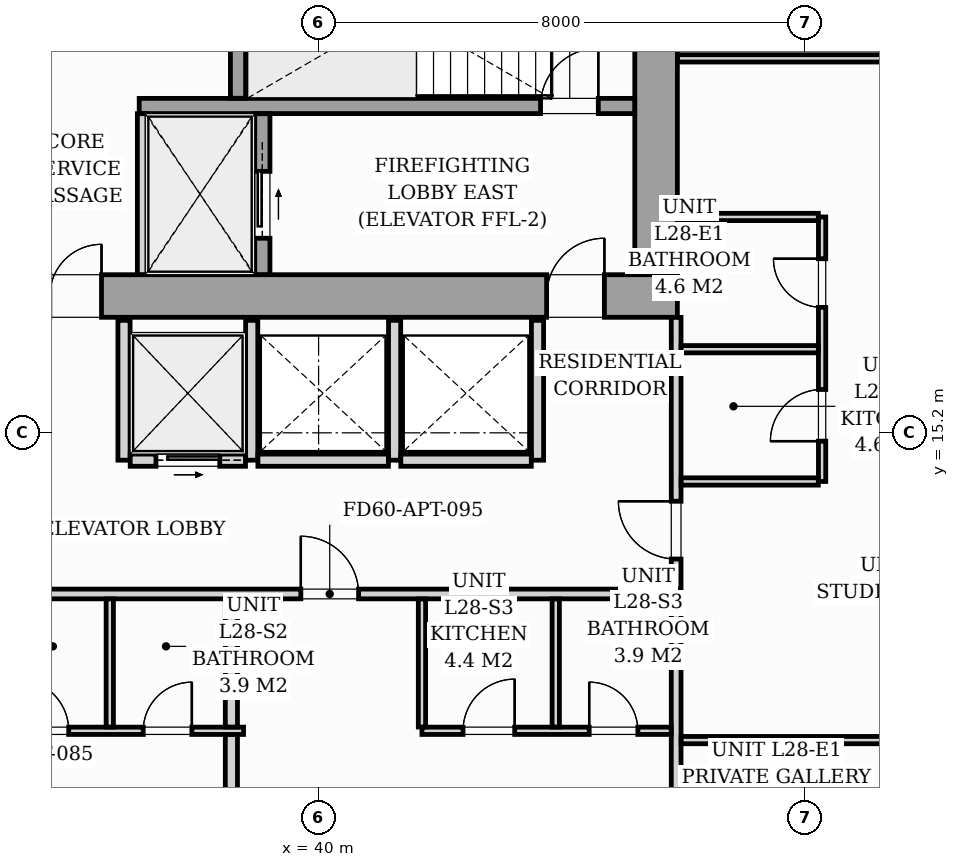
"""IFC4 building model, lengths in metres.
Left out: names, types, materials, properties, quantities, classifications, styles, units other than length and angle.
Written with IfcOpenShell. Run it as: python <this file> out.ifc"""

import sys

from ifc_helpers import new_model, si_unit, direction, frame, frame_2d, origin, origin_2d, place, context, subcontext, project, spatial, rectangle, i_section, extrude, source, transform, mapped, element, fill, save


model = new_model("IFC4")
c1 = context("Model", 3, precision=1e-05, world=origin(), true_north=direction((0.0, 1.0)))
c2 = subcontext(c1, "Body", "Model", "MODEL_VIEW")
j1 = project(units=[si_unit("LENGTHUNIT", "METRE"), si_unit("PLANEANGLEUNIT", "RADIAN")], contexts=[c1])
p1 = place(None, origin())
s1 = spatial("IfcSite", under=j1, at=p1, CompositionType="ELEMENT")
p2 = place(p1, origin())
s2 = spatial("IfcBuilding", under=s1, at=p2, CompositionType="ELEMENT")
p3 = place(p2, frame((0.0, 0.0, 100.2)))
s3 = spatial("IfcBuildingStorey", under=s2, at=p3, CompositionType="ELEMENT", Elevation=100.2)
m1 = source(origin(), c2, "Body", "SweptSolid", [
    extrude(i_section(OverallWidth=0.427, OverallDepth=0.483, WebThickness=0.051, FlangeThickness=0.082, FilletRadius=0.018, at=origin_2d()), origin(), (0.0, 0.0, 1.0), 3.196),
])
for number, where, z_axis, x_axis in (
    (1, (38.88, 17.4, 0.002), (0.0, 0.0, 1.0), (1.0, 0.0, 0.0)),
    (2, (45.6, 17.4, 0.002), (0.0, 0.0, 1.0), (1.0, 0.0, 0.0)),
):
    element("IfcColumn", number, at=place(p3, frame(where, z_axis=z_axis, x_axis=x_axis)), inside=s3, PredefinedType="PILASTER", context=c2, shape_type="MappedRepresentation", body=[
        mapped(m1, transform((0.0, 0.0, 0.0), scale=1.0)),
    ])
p4 = place(p3, frame((26.1, 17.45, 0.0), z_axis=(0.0, 0.0, 1.0), x_axis=(1.0, 0.0, 0.0)))
e3 = element("IfcWall", 3, at=p4, inside=s3, PredefinedType="SHEAR", context=c2, shape_type="SweptSolid", body=[
    extrude(rectangle(XDim=19.8, YDim=0.7, at=frame_2d((9.9, 0.0))), origin(), (0.0, 0.0, 1.0), 3.2),
])
p5 = place(p4, frame((1.05, 0.0, 0.0)))
e4 = element("IfcOpeningElement", 4, at=p5, cuts=e3, PredefinedType="OPENING", context=c2, shape_type="SweptSolid", body=[
    extrude(rectangle(XDim=0.95, YDim=2.06, at=frame_2d((0.475, 1.03))), frame((0.0, 0.36, 0.0), z_axis=(0.0, -1.0, 0.0), x_axis=(1.0, 0.0, 0.0)), (0.0, 0.0, 1.0), 0.72),
])
p6 = place(p4, frame((9.48, 0.0, 0.0)))
e5 = element("IfcOpeningElement", 5, at=p6, cuts=e3, PredefinedType="OPENING", context=c2, shape_type="SweptSolid", body=[
    extrude(rectangle(XDim=0.85, YDim=2.0, at=frame_2d((0.425, 1.0))), frame((0.0, 0.36, 0.0), z_axis=(0.0, -1.0, 0.0), x_axis=(1.0, 0.0, 0.0)), (0.0, 0.0, 1.0), 0.72),
])
p7 = place(p4, frame((17.65, 0.0, 0.0)))
e6 = element("IfcOpeningElement", 6, at=p7, cuts=e3, PredefinedType="OPENING", context=c2, shape_type="SweptSolid", body=[
    extrude(rectangle(XDim=0.95, YDim=2.06, at=frame_2d((0.475, 1.03))), frame((0.0, 0.36, 0.0), z_axis=(0.0, -1.0, 0.0), x_axis=(1.0, 0.0, 0.0)), (0.0, 0.0, 1.0), 0.72),
])
p8 = place(p3, frame((45.55, 17.802, 0.0), z_axis=(0.0, 0.0, 1.0), x_axis=(0.0, 1.0, 0.0)))
e7 = element("IfcWall", 7, at=p8, inside=s3, PredefinedType="SHEAR", context=c2, shape_type="SweptSolid", body=[
    extrude(rectangle(XDim=5.796, YDim=0.7, at=frame_2d((2.898, 0.0))), origin(), (0.0, 0.0, 1.0), 3.2),
])
p9 = place(p3, frame((37.05, 20.575, 0.0), z_axis=(0.0, 0.0, 1.0), x_axis=(1.0, 0.0, 0.0)))
e8 = element("IfcWall", 8, at=p9, inside=s3, PredefinedType="SOLIDWALL", context=c2, shape_type="SweptSolid", body=[
    extrude(rectangle(XDim=8.148, YDim=0.25, at=frame_2d((4.074, 0.0))), origin(), (0.0, 0.0, 1.0), 3.2),
])
p10 = place(p9, frame((6.6, 0.0, 0.0)))
e9 = element("IfcOpeningElement", 9, at=p10, cuts=e8, PredefinedType="OPENING", context=c2, shape_type="SweptSolid", body=[
    extrude(rectangle(XDim=0.95, YDim=2.06, at=frame_2d((0.475, 1.03))), frame((0.0, 0.135, 0.0), z_axis=(0.0, -1.0, 0.0), x_axis=(1.0, 0.0, 0.0)), (0.0, 0.0, 1.0), 0.27),
])
p11 = place(p3, frame((38.675, 20.702, 0.0), z_axis=(0.0, 0.0, 1.0), x_axis=(0.0, 1.0, 0.0)))
e10 = element("IfcWall", 10, at=p11, inside=s3, PredefinedType="SOLIDWALL", context=c2, shape_type="SweptSolid", body=[
    extrude(rectangle(XDim=2.896, YDim=0.25, at=frame_2d((1.448, 0.0))), origin(), (0.0, 0.0, 1.0), 3.2),
])
p12 = place(p3, frame((37.1, 17.802, 0.0), z_axis=(0.0, 0.0, 1.0), x_axis=(0.0, 1.0, 0.0)))
e11 = element("IfcWall", 11, at=p12, inside=s3, PredefinedType="PARTITIONING", context=c2, shape_type="SweptSolid", body=[
    extrude(rectangle(XDim=2.646, YDim=0.16, at=frame_2d((1.323, 0.0))), origin(), (0.0, 0.0, 1.0), 2.94),
])
p13 = place(p3, frame((39.075, 17.802, 0.0), z_axis=(0.0, 0.0, 1.0), x_axis=(0.0, 1.0, 0.0)))
e12 = element("IfcWall", 12, at=p13, inside=s3, PredefinedType="SOLIDWALL", context=c2, shape_type="SweptSolid", body=[
    extrude(rectangle(XDim=2.646, YDim=0.25, at=frame_2d((1.323, 0.0))), origin(), (0.0, 0.0, 1.0), 3.2),
])
p14 = place(p13, frame((0.598, 0.0, 0.0)))
e13 = element("IfcOpeningElement", 13, at=p14, cuts=e12, PredefinedType="OPENING", context=c2, shape_type="SweptSolid", body=[
    extrude(rectangle(XDim=1.1, YDim=2.08, at=frame_2d((0.55, 1.04))), frame((0.0, 0.135, 0.0), z_axis=(0.0, -1.0, 0.0), x_axis=(1.0, 0.0, 0.0)), (0.0, 0.0, 1.0), 0.27),
])
for number, where, z_axis, x_axis in (
    (14, (36.8, 14.75, 0.0), (0.0, 0.0, 1.0), (0.0, 1.0, 0.0)),
    (15, (38.9, 14.75, 0.0), (0.0, 0.0, 1.0), (0.0, 1.0, 0.0)),
):
    element("IfcWall", number, at=place(p3, frame(where, z_axis=z_axis, x_axis=x_axis)), inside=s3, PredefinedType="PARTITIONING", context=c2, shape_type="SweptSolid", body=[
        extrude(rectangle(XDim=2.3, YDim=0.2, at=frame_2d((1.15, 0.0))), origin(), (0.0, 0.0, 1.0), 2.94),
    ])
p15 = place(p3, frame((36.902, 14.75, 0.0), z_axis=(0.0, 0.0, 1.0), x_axis=(1.0, 0.0, 0.0)))
e16 = element("IfcWall", 16, at=p15, inside=s3, PredefinedType="PARTITIONING", context=c2, shape_type="SweptSolid", body=[
    extrude(rectangle(XDim=1.896, YDim=0.2, at=frame_2d((0.948, 0.0))), origin(), (0.0, 0.0, 1.0), 2.94),
])
p16 = place(p15, frame((0.423, 0.0, 0.0)))
e17 = element("IfcOpeningElement", 17, at=p16, cuts=e16, PredefinedType="OPENING", context=c2, shape_type="SweptSolid", body=[
    extrude(rectangle(XDim=1.05, YDim=2.08, at=frame_2d((0.525, 1.04))), frame((0.0, 0.11, 0.0), z_axis=(0.0, -1.0, 0.0), x_axis=(1.0, 0.0, 0.0)), (0.0, 0.0, 1.0), 0.22),
])
for number, where, z_axis, x_axis in (
    (18, (41.25, 14.75, 0.0), (0.0, 0.0, 1.0), (0.0, 1.0, 0.0)),
    (19, (43.6, 14.75, 0.0), (0.0, 0.0, 1.0), (0.0, 1.0, 0.0)),
):
    element("IfcWall", number, at=place(p3, frame(where, z_axis=z_axis, x_axis=x_axis)), inside=s3, PredefinedType="PARTITIONING", context=c2, shape_type="SweptSolid", body=[
        extrude(rectangle(XDim=2.3, YDim=0.2, at=frame_2d((1.15, 0.0))), origin(), (0.0, 0.0, 1.0), 2.94),
    ])
for number, where, z_axis, x_axis in (
    (20, (39.002, 14.75, 0.0), (0.0, 0.0, 1.0), (1.0, 0.0, 0.0)),
    (21, (41.352, 14.75, 0.0), (0.0, 0.0, 1.0), (1.0, 0.0, 0.0)),
):
    element("IfcWall", number, at=place(p3, frame(where, z_axis=z_axis, x_axis=x_axis)), inside=s3, PredefinedType="PARTITIONING", context=c2, shape_type="SweptSolid", body=[
        extrude(rectangle(XDim=2.146, YDim=0.2, at=frame_2d((1.073, 0.0))), origin(), (0.0, 0.0, 1.0), 2.94),
    ])
p17 = place(p3, frame((21.5, 12.55, 0.0), z_axis=(0.0, 0.0, 1.0), x_axis=(1.0, 0.0, 0.0)))
e22 = element("IfcWall", 22, at=p17, inside=s3, PredefinedType="PARTITIONING", context=c2, shape_type="SweptSolid", body=[
    extrude(rectangle(XDim=24.38, YDim=0.16, at=frame_2d((12.19, 0.0))), origin(), (0.0, 0.0, 1.0), 2.94),
])
p18 = place(p17, frame((6.075, 0.0, 0.0)))
e23 = element("IfcOpeningElement", 23, at=p18, cuts=e22, PredefinedType="OPENING", context=c2, shape_type="SweptSolid", body=[
    extrude(rectangle(XDim=0.95, YDim=2.06, at=frame_2d((0.475, 1.03))), frame((0.0, 0.09, 0.0), z_axis=(0.0, -1.0, 0.0), x_axis=(1.0, 0.0, 0.0)), (0.0, 0.0, 1.0), 0.18),
])
p19 = place(p17, frame((10.519, 0.0, 0.0)))
e24 = element("IfcOpeningElement", 24, at=p19, cuts=e22, PredefinedType="OPENING", context=c2, shape_type="SweptSolid", body=[
    extrude(rectangle(XDim=0.95, YDim=2.06, at=frame_2d((0.475, 1.03))), frame((0.0, 0.09, 0.0), z_axis=(0.0, -1.0, 0.0), x_axis=(1.0, 0.0, 0.0)), (0.0, 0.0, 1.0), 0.18),
])
p20 = place(p17, frame((18.208, 0.0, 0.0)))
e25 = element("IfcOpeningElement", 25, at=p20, cuts=e22, PredefinedType="OPENING", context=c2, shape_type="SweptSolid", body=[
    extrude(rectangle(XDim=0.95, YDim=2.06, at=frame_2d((0.475, 1.03))), frame((0.0, 0.09, 0.0), z_axis=(0.0, -1.0, 0.0), x_axis=(1.0, 0.0, 0.0)), (0.0, 0.0, 1.0), 0.18),
])
p21 = place(p3, frame((45.88, 6.977, 0.0), z_axis=(0.0, 0.0, 1.0), x_axis=(0.0, 1.0, 0.0)))
e26 = element("IfcWall", 26, at=p21, inside=s3, PredefinedType="PARTITIONING", context=c2, shape_type="SweptSolid", body=[
    extrude(rectangle(XDim=5.491, YDim=0.16, at=frame_2d((2.745, 0.0))), origin(), (0.0, 0.0, 1.0), 2.94),
])
p22 = place(p3, frame((45.88, 12.632, 0.0), z_axis=(0.0, 0.0, 1.0), x_axis=(0.0, 1.0, 0.0)))
e27 = element("IfcWall", 27, at=p22, inside=s3, PredefinedType="PARTITIONING", context=c2, shape_type="SweptSolid", body=[
    extrude(rectangle(XDim=4.466, YDim=0.16, at=frame_2d((2.233, 0.0))), origin(), (0.0, 0.0, 1.0), 2.94),
])
p23 = place(p22, frame((0.493, 0.0, 0.0)))
e28 = element("IfcOpeningElement", 28, at=p23, cuts=e27, PredefinedType="OPENING", context=c2, shape_type="SweptSolid", body=[
    extrude(rectangle(XDim=0.95, YDim=2.06, at=frame_2d((0.475, 1.03))), frame((0.0, 0.09, 0.0), z_axis=(0.0, -1.0, 0.0), x_axis=(1.0, 0.0, 0.0)), (0.0, 0.0, 1.0), 0.18),
])
p24 = place(p3, frame((34.366, 10.3, 0.0), z_axis=(0.0, 0.0, 1.0), x_axis=(1.0, 0.0, 0.0)))
e29 = element("IfcWall", 29, at=p24, inside=s3, PredefinedType="PARTITIONING", context=c2, shape_type="SweptSolid", body=[
    extrude(rectangle(XDim=4.4, YDim=0.12, at=frame_2d((2.2, 0.0))), origin(), (0.0, 0.0, 1.0), 2.94),
])
p25 = place(p24, frame((0.675, 0.0, 0.0)))
e30 = element("IfcOpeningElement", 30, at=p25, cuts=e29, PredefinedType="OPENING", context=c2, shape_type="SweptSolid", body=[
    extrude(rectangle(XDim=0.85, YDim=2.05, at=frame_2d((0.425, 1.025))), frame((0.0, 0.07, 0.0), z_axis=(0.0, -1.0, 0.0), x_axis=(1.0, 0.0, 0.0)), (0.0, 0.0, 1.0), 0.14),
])
p26 = place(p24, frame((2.75, 0.0, 0.0)))
e31 = element("IfcOpeningElement", 31, at=p26, cuts=e29, PredefinedType="OPENING", context=c2, shape_type="SweptSolid", body=[
    extrude(rectangle(XDim=0.8, YDim=2.02, at=frame_2d((0.4, 1.01))), frame((0.0, 0.07, 0.0), z_axis=(0.0, -1.0, 0.0), x_axis=(1.0, 0.0, 0.0)), (0.0, 0.0, 1.0), 0.14),
])
p27 = place(p3, frame((36.566, 10.362, 0.0), z_axis=(0.0, 0.0, 1.0), x_axis=(0.0, 1.0, 0.0)))
e32 = element("IfcWall", 32, at=p27, inside=s3, PredefinedType="PARTITIONING", context=c2, shape_type="SweptSolid", body=[
    extrude(rectangle(XDim=2.106, YDim=0.12, at=frame_2d((1.053, 0.0))), origin(), (0.0, 0.0, 1.0), 2.94),
])
p28 = place(p3, frame((38.566, 6.273, 0.0), z_axis=(0.0, 0.0, 1.0), x_axis=(0.0, 1.0, 0.0)))
e33 = element("IfcWall", 33, at=p28, inside=s3, PredefinedType="PARTITIONING", context=c2, shape_type="SweptSolid", body=[
    extrude(rectangle(XDim=3.965, YDim=0.2, at=frame_2d((1.982, 0.0))), origin(), (0.0, 0.0, 1.0), 2.94),
])
p29 = place(p3, frame((38.566, 10.362, 0.0), z_axis=(0.0, 0.0, 1.0), x_axis=(0.0, 1.0, 0.0)))
e34 = element("IfcWall", 34, at=p29, inside=s3, PredefinedType="PARTITIONING", context=c2, shape_type="SweptSolid", body=[
    extrude(rectangle(XDim=2.106, YDim=0.2, at=frame_2d((1.053, 0.0))), origin(), (0.0, 0.0, 1.0), 2.94),
])
p30 = place(p3, frame((41.7, 10.3, 0.0), z_axis=(0.0, 0.0, 1.0), x_axis=(1.0, 0.0, 0.0)))
e35 = element("IfcWall", 35, at=p30, inside=s3, PredefinedType="PARTITIONING", context=c2, shape_type="SweptSolid", body=[
    extrude(rectangle(XDim=4.098, YDim=0.12, at=frame_2d((2.049, 0.0))), origin(), (0.0, 0.0, 1.0), 2.94),
])
p31 = place(p30, frame((0.675, 0.0, 0.0)))
e36 = element("IfcOpeningElement", 36, at=p31, cuts=e35, PredefinedType="OPENING", context=c2, shape_type="SweptSolid", body=[
    extrude(rectangle(XDim=0.85, YDim=2.05, at=frame_2d((0.425, 1.025))), frame((0.0, 0.07, 0.0), z_axis=(0.0, -1.0, 0.0), x_axis=(1.0, 0.0, 0.0)), (0.0, 0.0, 1.0), 0.14),
])
p32 = place(p30, frame((2.75, 0.0, 0.0)))
e37 = element("IfcOpeningElement", 37, at=p32, cuts=e35, PredefinedType="OPENING", context=c2, shape_type="SweptSolid", body=[
    extrude(rectangle(XDim=0.8, YDim=2.02, at=frame_2d((0.4, 1.01))), frame((0.0, 0.07, 0.0), z_axis=(0.0, -1.0, 0.0), x_axis=(1.0, 0.0, 0.0)), (0.0, 0.0, 1.0), 0.14),
])
for number, where, z_axis, x_axis in (
    (38, (41.7, 10.362, 0.0), (0.0, 0.0, 1.0), (0.0, 1.0, 0.0)),
    (39, (43.9, 10.362, 0.0), (0.0, 0.0, 1.0), (0.0, 1.0, 0.0)),
):
    element("IfcWall", number, at=place(p3, frame(where, z_axis=z_axis, x_axis=x_axis)), inside=s3, PredefinedType="PARTITIONING", context=c2, shape_type="SweptSolid", body=[
        extrude(rectangle(XDim=2.106, YDim=0.12, at=frame_2d((1.053, 0.0))), origin(), (0.0, 0.0, 1.0), 2.94),
    ])
p33 = place(p3, frame((48.28, 14.4, 0.0), z_axis=(0.0, 0.0, 1.0), x_axis=(0.0, 1.0, 0.0)))
e40 = element("IfcWall", 40, at=p33, inside=s3, PredefinedType="PARTITIONING", context=c2, shape_type="SweptSolid", body=[
    extrude(rectangle(XDim=4.35, YDim=0.12, at=frame_2d((2.175, 0.0))), origin(), (0.0, 0.0, 1.0), 2.94),
])
p34 = place(p33, frame((0.663, 0.0, 0.0)))
e41 = element("IfcOpeningElement", 41, at=p34, cuts=e40, PredefinedType="OPENING", context=c2, shape_type="SweptSolid", body=[
    extrude(rectangle(XDim=0.85, YDim=2.05, at=frame_2d((0.425, 1.025))), frame((0.0, 0.07, 0.0), z_axis=(0.0, -1.0, 0.0), x_axis=(1.0, 0.0, 0.0)), (0.0, 0.0, 1.0), 0.14),
])
p35 = place(p33, frame((2.863, 0.0, 0.0)))
e42 = element("IfcOpeningElement", 42, at=p35, cuts=e40, PredefinedType="OPENING", context=c2, shape_type="SweptSolid", body=[
    extrude(rectangle(XDim=0.8, YDim=2.02, at=frame_2d((0.4, 1.01))), frame((0.0, 0.07, 0.0), z_axis=(0.0, -1.0, 0.0), x_axis=(1.0, 0.0, 0.0)), (0.0, 0.0, 1.0), 0.14),
])
for number, where, z_axis, x_axis in (
    (43, (45.962, 16.575, 0.0), (0.0, 0.0, 1.0), (1.0, 0.0, 0.0)),
    (44, (45.962, 14.4, 0.0), (0.0, 0.0, 1.0), (1.0, 0.0, 0.0)),
):
    element("IfcWall", number, at=place(p3, frame(where, z_axis=z_axis, x_axis=x_axis)), inside=s3, PredefinedType="PARTITIONING", context=c2, shape_type="SweptSolid", body=[
        extrude(rectangle(XDim=2.256, YDim=0.12, at=frame_2d((1.128, 0.0))), origin(), (0.0, 0.0, 1.0), 2.94),
    ])
p36 = place(p3, frame((45.902, 18.75, 0.0), z_axis=(0.0, 0.0, 1.0), x_axis=(1.0, 0.0, 0.0)))
e45 = element("IfcWall", 45, at=p36, inside=s3, PredefinedType="PARTITIONING", context=c2, shape_type="SweptSolid", body=[
    extrude(rectangle(XDim=2.316, YDim=0.12, at=frame_2d((1.158, 0.0))), origin(), (0.0, 0.0, 1.0), 2.94),
])
p37 = place(p3, frame((45.902, 21.358, 0.0), z_axis=(0.0, 0.0, 1.0), x_axis=(1.0, 0.0, 0.0)))
e46 = element("IfcWall", 46, at=p37, inside=s3, PredefinedType="PARTITIONING", context=c2, shape_type="SweptSolid", body=[
    extrude(rectangle(XDim=22.668, YDim=0.12, at=frame_2d((11.334, 0.0))), origin(), (0.0, 0.0, 1.0), 2.94),
])
p38 = place(p37, frame((10.945, 0.0, 0.0)))
e47 = element("IfcOpeningElement", 47, at=p38, cuts=e46, PredefinedType="OPENING", context=c2, shape_type="SweptSolid", body=[
    extrude(rectangle(XDim=0.85, YDim=2.05, at=frame_2d((0.425, 1.025))), frame((0.0, 0.07, 0.0), z_axis=(0.0, -1.0, 0.0), x_axis=(1.0, 0.0, 0.0)), (0.0, 0.0, 1.0), 0.14),
])
p39 = place(p3, frame((45.962, 10.147, 0.0), z_axis=(0.0, 0.0, 1.0), x_axis=(1.0, 0.0, 0.0)))
e48 = element("IfcWall", 48, at=p39, inside=s3, PredefinedType="PARTITIONING", context=c2, shape_type="SweptSolid", body=[
    extrude(rectangle(XDim=20.994, YDim=0.12, at=frame_2d((10.497, 0.0))), origin(), (0.0, 0.0, 1.0), 2.31),
])
p40 = place(p39, frame((10.227, 0.0, 0.0)))
e49 = element("IfcOpeningElement", 49, at=p40, cuts=e48, PredefinedType="OPENING", context=c2, shape_type="SweptSolid", body=[
    extrude(rectangle(XDim=0.85, YDim=2.05, at=frame_2d((0.425, 1.025))), frame((0.0, 0.07, 0.0), z_axis=(0.0, -1.0, 0.0), x_axis=(1.0, 0.0, 0.0)), (0.0, 0.0, 1.0), 0.14),
])
m2 = source(origin(), c2, "Body", "SweptSolid", [
    extrude(rectangle(XDim=0.85, YDim=2.0, at=frame_2d((0.425, 1.0))), frame((0.0, 0.025, 0.0), z_axis=(0.0, -1.0, 0.0), x_axis=(1.0, 0.0, 0.0)), (0.0, 0.0, 1.0), 0.05),
])
p41 = place(p6, origin())
e50 = element("IfcDoor", 50, at=p41, inside=s3, OperationType="SINGLE_SWING_RIGHT", PredefinedType="DOOR", context=c2, shape_type="MappedRepresentation", body=[
    mapped(m2, transform((0.0, 0.0, 0.0), scale=1.0)),
])
fill(e5, e50)
m3 = source(origin(), c2, "Body", "SweptSolid", [
    extrude(rectangle(XDim=0.95, YDim=2.06, at=frame_2d((0.475, 1.03))), frame((0.0, 0.025, 0.0), z_axis=(0.0, -1.0, 0.0), x_axis=(1.0, 0.0, 0.0)), (0.0, 0.0, 1.0), 0.05),
])
p42 = place(p7, origin())
e51 = element("IfcDoor", 51, at=p42, inside=s3, OperationType="SINGLE_SWING_RIGHT", PredefinedType="DOOR", context=c2, shape_type="MappedRepresentation", body=[
    mapped(m3, transform((0.0, 0.0, 0.0), scale=1.0)),
])
fill(e6, e51)
p43 = place(p10, origin())
e52 = element("IfcDoor", 52, at=p43, inside=s3, OperationType="SINGLE_SWING_RIGHT", PredefinedType="DOOR", context=c2, shape_type="MappedRepresentation", body=[
    mapped(m3, transform((0.0, 0.0, 0.0), scale=1.0)),
])
fill(e9, e52)
m4 = source(origin(), c2, "Body", "SweptSolid", [
    extrude(rectangle(XDim=1.1, YDim=2.08, at=frame_2d((0.55, 1.04))), frame((0.0, 0.025, 0.0), z_axis=(0.0, -1.0, 0.0), x_axis=(1.0, 0.0, 0.0)), (0.0, 0.0, 1.0), 0.05),
])
p44 = place(p14, origin())
e53 = element("IfcDoor", 53, at=p44, inside=s3, OperationType="SLIDING_TO_RIGHT", PredefinedType="DOOR", context=c2, shape_type="MappedRepresentation", body=[
    mapped(m4, transform((0.0, 0.0, 0.0), scale=1.0)),
])
fill(e13, e53)
m5 = source(origin(), c2, "Body", "SweptSolid", [
    extrude(rectangle(XDim=1.05, YDim=2.08, at=frame_2d((0.525, 1.04))), frame((0.0, 0.025, 0.0), z_axis=(0.0, -1.0, 0.0), x_axis=(1.0, 0.0, 0.0)), (0.0, 0.0, 1.0), 0.05),
])
p45 = place(p16, origin())
e54 = element("IfcDoor", 54, at=p45, inside=s3, OperationType="SLIDING_TO_RIGHT", PredefinedType="DOOR", context=c2, shape_type="MappedRepresentation", body=[
    mapped(m5, transform((0.0, 0.0, 0.0), scale=1.0)),
])
fill(e17, e54)
m6 = source(origin(), c2, "Body", "SweptSolid", [
    extrude(rectangle(XDim=0.85, YDim=2.05, at=frame_2d((0.425, 1.025))), frame((0.0, 0.025, 0.0), z_axis=(0.0, -1.0, 0.0), x_axis=(1.0, 0.0, 0.0)), (0.0, 0.0, 1.0), 0.05),
])
p46 = place(p25, origin())
e55 = element("IfcDoor", 55, at=p46, inside=s3, OperationType="SINGLE_SWING_LEFT", PredefinedType="DOOR", context=c2, shape_type="MappedRepresentation", body=[
    mapped(m6, transform((0.0, 0.0, 0.0), scale=1.0)),
])
fill(e30, e55)
m7 = source(origin(), c2, "Body", "SweptSolid", [
    extrude(rectangle(XDim=0.8, YDim=2.02, at=frame_2d((0.4, 1.01))), frame((0.0, 0.025, 0.0), z_axis=(0.0, -1.0, 0.0), x_axis=(1.0, 0.0, 0.0)), (0.0, 0.0, 1.0), 0.05),
])
p47 = place(p26, origin())
e56 = element("IfcDoor", 56, at=p47, inside=s3, OperationType="SINGLE_SWING_RIGHT", PredefinedType="DOOR", context=c2, shape_type="MappedRepresentation", body=[
    mapped(m7, transform((0.0, 0.0, 0.0), scale=1.0)),
])
fill(e31, e56)
m8 = source(origin(), c2, "Body", "SweptSolid", [
    extrude(rectangle(XDim=0.95, YDim=2.06, at=frame_2d((0.475, 1.03))), frame((0.0, 0.025, 0.0), z_axis=(0.0, -1.0, 0.0), x_axis=(1.0, 0.0, 0.0)), (0.0, 0.0, 1.0), 0.05),
])
p48 = place(p20, origin())
e57 = element("IfcDoor", 57, at=p48, inside=s3, OperationType="SINGLE_SWING_LEFT", PredefinedType="DOOR", context=c2, shape_type="MappedRepresentation", body=[
    mapped(m8, transform((0.0, 0.0, 0.0), scale=1.0)),
])
fill(e25, e57)
p49 = place(p31, origin())
e58 = element("IfcDoor", 58, at=p49, inside=s3, OperationType="SINGLE_SWING_RIGHT", PredefinedType="DOOR", context=c2, shape_type="MappedRepresentation", body=[
    mapped(m6, transform((0.0, 0.0, 0.0), scale=1.0)),
])
fill(e36, e58)
p50 = place(p32, origin())
e59 = element("IfcDoor", 59, at=p50, inside=s3, OperationType="SINGLE_SWING_LEFT", PredefinedType="DOOR", context=c2, shape_type="MappedRepresentation", body=[
    mapped(m7, transform((0.0, 0.0, 0.0), scale=1.0)),
])
fill(e37, e59)
p51 = place(p23, origin())
e60 = element("IfcDoor", 60, at=p51, inside=s3, OperationType="SINGLE_SWING_RIGHT", PredefinedType="DOOR", context=c2, shape_type="MappedRepresentation", body=[
    mapped(m8, transform((0.0, 0.0, 0.0), scale=1.0)),
])
fill(e28, e60)
p52 = place(p34, origin())
e61 = element("IfcDoor", 61, at=p52, inside=s3, OperationType="SINGLE_SWING_LEFT", PredefinedType="DOOR", context=c2, shape_type="MappedRepresentation", body=[
    mapped(m6, transform((0.0, 0.0, 0.0), scale=1.0)),
])
fill(e41, e61)
p53 = place(p35, origin())
e62 = element("IfcDoor", 62, at=p53, inside=s3, OperationType="SINGLE_SWING_RIGHT", PredefinedType="DOOR", context=c2, shape_type="MappedRepresentation", body=[
    mapped(m7, transform((0.0, 0.0, 0.0), scale=1.0)),
])
fill(e42, e62)
save(model, sys.argv[1])
